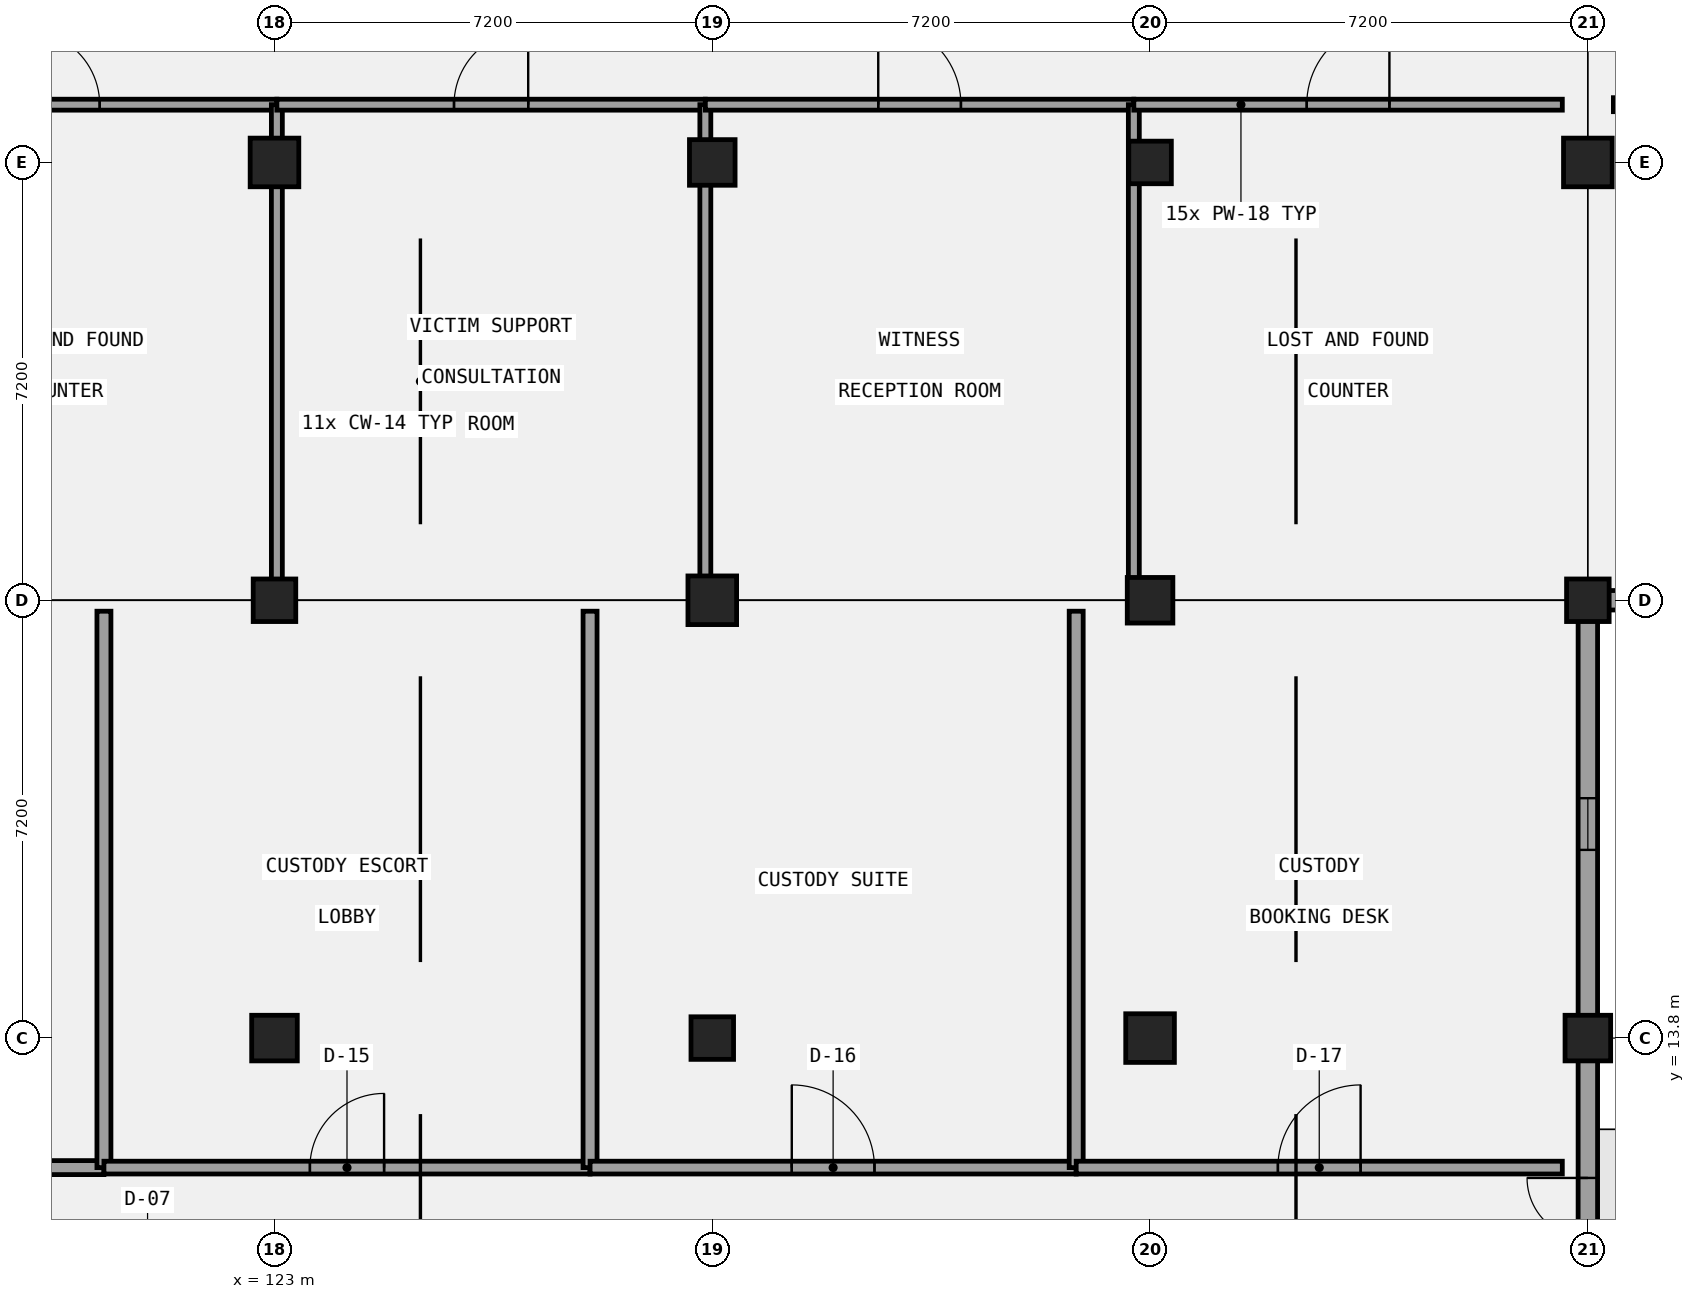
"""IFC4 building model, lengths in metres.
Left out: names, types, materials, properties, quantities, classifications, styles, units other than length and angle.
Written with IfcOpenShell. Run it as: python <this file> out.ifc"""

import sys

from ifc_helpers import new_model, si_unit, direction, frame, frame_2d, origin, origin_2d, place, context, subcontext, project, spatial, rectangle, extrude, element, fill, save


model = new_model("IFC4")
c1 = context("Model", 3, precision=1e-05, world=origin(), true_north=direction((0.0, 1.0)))
c2 = subcontext(c1, "Body", "Model", "MODEL_VIEW")
j1 = project(units=[si_unit("LENGTHUNIT", "METRE"), si_unit("PLANEANGLEUNIT", "RADIAN")], contexts=[c1])
p1 = place(None, origin())
s1 = spatial("IfcSite", under=j1, at=p1, CompositionType="ELEMENT")
p2 = place(p1, origin())
s2 = spatial("IfcBuilding", under=s1, at=p2, CompositionType="ELEMENT")
p3 = place(p2, origin())
s3 = spatial("IfcBuildingStorey", under=s2, at=p3, CompositionType="ELEMENT", Elevation=0.0)
p4 = place(p3, frame((123.0, 13.8, -0.32), z_axis=(0.0, 0.0, 1.0), x_axis=(1.0, 0.0, 0.0)))
e1 = element("IfcColumn", 1, at=p4, inside=s3, PredefinedType="COLUMN", context=c2, shape_type="SweptSolid", body=[
    extrude(rectangle(XDim=0.75, YDim=0.75, at=origin_2d()), origin(), (0.0, 0.0, 1.0), 5.72),
])
p5 = place(p3, frame((123.0, 21.0, 0.0), z_axis=(0.0, 0.0, 1.0), x_axis=(1.0, 0.0, 0.0)))
e2 = element("IfcColumn", 2, at=p5, inside=s3, PredefinedType="COLUMN", context=c2, shape_type="SweptSolid", body=[
    extrude(rectangle(XDim=0.7, YDim=0.7, at=origin_2d()), origin(), (0.0, 0.0, 1.0), 5.4),
])
p6 = place(p3, frame((123.0, 28.2, 0.0), z_axis=(0.0, 0.0, 1.0), x_axis=(1.0, 0.0, 0.0)))
e3 = element("IfcColumn", 3, at=p6, inside=s3, PredefinedType="COLUMN", context=c2, shape_type="SweptSolid", body=[
    extrude(rectangle(XDim=0.8, YDim=0.8, at=origin_2d()), origin(), (0.0, 0.0, 1.0), 5.4),
])
p7 = place(p3, frame((130.2, 13.8, -0.32), z_axis=(0.0, 0.0, 1.0), x_axis=(1.0, 0.0, 0.0)))
e4 = element("IfcColumn", 4, at=p7, inside=s3, PredefinedType="COLUMN", context=c2, shape_type="SweptSolid", body=[
    extrude(rectangle(XDim=0.7, YDim=0.7, at=origin_2d()), origin(), (0.0, 0.0, 1.0), 5.72),
])
p8 = place(p3, frame((130.2, 21.0, 0.0), z_axis=(0.0, 0.0, 1.0), x_axis=(1.0, 0.0, 0.0)))
e5 = element("IfcColumn", 5, at=p8, inside=s3, PredefinedType="COLUMN", context=c2, shape_type="SweptSolid", body=[
    extrude(rectangle(XDim=0.8, YDim=0.8, at=origin_2d()), origin(), (0.0, 0.0, 1.0), 5.4),
])
p9 = place(p3, frame((130.2, 28.2, 0.0), z_axis=(0.0, 0.0, 1.0), x_axis=(1.0, 0.0, 0.0)))
e6 = element("IfcColumn", 6, at=p9, inside=s3, PredefinedType="COLUMN", context=c2, shape_type="SweptSolid", body=[
    extrude(rectangle(XDim=0.75, YDim=0.75, at=origin_2d()), origin(), (0.0, 0.0, 1.0), 5.4),
])
p10 = place(p3, frame((137.4, 13.8, -0.32), z_axis=(0.0, 0.0, 1.0), x_axis=(1.0, 0.0, 0.0)))
e7 = element("IfcColumn", 7, at=p10, inside=s3, PredefinedType="COLUMN", context=c2, shape_type="SweptSolid", body=[
    extrude(rectangle(XDim=0.8, YDim=0.8, at=origin_2d()), origin(), (0.0, 0.0, 1.0), 5.72),
])
p11 = place(p3, frame((137.4, 21.0, 0.0), z_axis=(0.0, 0.0, 1.0), x_axis=(1.0, 0.0, 0.0)))
e8 = element("IfcColumn", 8, at=p11, inside=s3, PredefinedType="COLUMN", context=c2, shape_type="SweptSolid", body=[
    extrude(rectangle(XDim=0.75, YDim=0.75, at=origin_2d()), origin(), (0.0, 0.0, 1.0), 5.4),
])
p12 = place(p3, frame((137.4, 28.2, 0.0), z_axis=(0.0, 0.0, 1.0), x_axis=(1.0, 0.0, 0.0)))
e9 = element("IfcColumn", 9, at=p12, inside=s3, PredefinedType="COLUMN", context=c2, shape_type="SweptSolid", body=[
    extrude(rectangle(XDim=0.7, YDim=0.7, at=origin_2d()), origin(), (0.0, 0.0, 1.0), 5.4),
])
p13 = place(p3, frame((144.6, 13.8, -0.32), z_axis=(0.0, 0.0, 1.0), x_axis=(1.0, 0.0, 0.0)))
e10 = element("IfcColumn", 10, at=p13, inside=s3, PredefinedType="COLUMN", context=c2, shape_type="SweptSolid", body=[
    extrude(rectangle(XDim=0.75, YDim=0.75, at=origin_2d()), origin(), (0.0, 0.0, 1.0), 5.72),
])
p14 = place(p3, frame((144.6, 21.0, 0.0), z_axis=(0.0, 0.0, 1.0), x_axis=(1.0, 0.0, 0.0)))
e11 = element("IfcColumn", 11, at=p14, inside=s3, PredefinedType="COLUMN", context=c2, shape_type="SweptSolid", body=[
    extrude(rectangle(XDim=0.7, YDim=0.7, at=origin_2d()), origin(), (0.0, 0.0, 1.0), 5.4),
])
p15 = place(p3, frame((144.6, 28.2, 0.0), z_axis=(0.0, 0.0, 1.0), x_axis=(1.0, 0.0, 0.0)))
e12 = element("IfcColumn", 12, at=p15, inside=s3, PredefinedType="COLUMN", context=c2, shape_type="SweptSolid", body=[
    extrude(rectangle(XDim=0.8, YDim=0.8, at=origin_2d()), origin(), (0.0, 0.0, 1.0), 5.4),
])
p16 = place(p3, frame((144.6, 0.16, 0.0), z_axis=(0.0, 0.0, 1.0), x_axis=(0.0, 1.0, 0.0)))
e13 = element("IfcWall", 13, at=p16, inside=s3, PredefinedType="SOLIDWALL", context=c2, shape_type="SweptSolid", body=[
    extrude(rectangle(XDim=20.68, YDim=0.32, at=frame_2d((10.34, 0.0))), origin(), (0.0, 0.0, 1.0), 4.12),
])
p17 = place(p16, frame((9.34, 0.0, 0.0)))
e14 = element("IfcOpeningElement", 14, at=p17, cuts=e13, PredefinedType="OPENING", context=c2, shape_type="SweptSolid", body=[
    extrude(rectangle(XDim=2.0, YDim=2.6, at=frame_2d((1.0, 1.3))), frame((0.0, 0.17, 0.0), z_axis=(0.0, -1.0, 0.0), x_axis=(1.0, 0.0, 0.0)), (0.0, 0.0, 1.0), 0.34),
])
p18 = place(p16, frame((2.795, 0.0, 1.0)))
e15 = element("IfcOpeningElement", 15, at=p18, cuts=e13, PredefinedType="OPENING", context=c2, shape_type="SweptSolid", body=[
    extrude(rectangle(XDim=0.85, YDim=1.9, at=frame_2d((0.425, 0.95))), frame((0.0, 0.17, 0.0), z_axis=(0.0, -1.0, 0.0), x_axis=(1.0, 0.0, 0.0)), (0.0, 0.0, 1.0), 0.34),
])
p19 = place(p16, frame((16.735, 0.0, 1.0)))
e16 = element("IfcOpeningElement", 16, at=p19, cuts=e13, PredefinedType="OPENING", context=c2, shape_type="SweptSolid", body=[
    extrude(rectangle(XDim=0.85, YDim=1.9, at=frame_2d((0.425, 0.95))), frame((0.0, 0.17, 0.0), z_axis=(0.0, -1.0, 0.0), x_axis=(1.0, 0.0, 0.0)), (0.0, 0.0, 1.0), 0.34),
])
p20 = place(p3, frame((144.44, 21.0, 0.0), z_axis=(0.0, 0.0, 1.0), x_axis=(1.0, 0.0, 0.0)))
e17 = element("IfcWall", 17, at=p20, inside=s3, PredefinedType="SOLIDWALL", context=c2, shape_type="SweptSolid", body=[
    extrude(rectangle(XDim=29.72, YDim=0.32, at=frame_2d((14.86, 0.0))), origin(), (0.0, 0.0, 1.0), 3.35),
])
p21 = place(p20, frame((3.335, 0.0, 1.0)))
e18 = element("IfcOpeningElement", 18, at=p21, cuts=e17, PredefinedType="OPENING", context=c2, shape_type="SweptSolid", body=[
    extrude(rectangle(XDim=0.85, YDim=2.15, at=frame_2d((0.425, 1.075))), frame((0.0, 0.17, 0.0), z_axis=(0.0, -1.0, 0.0), x_axis=(1.0, 0.0, 0.0)), (0.0, 0.0, 1.0), 0.34),
])
p22 = place(p20, frame((10.535, 0.0, 1.0)))
e19 = element("IfcOpeningElement", 19, at=p22, cuts=e17, PredefinedType="OPENING", context=c2, shape_type="SweptSolid", body=[
    extrude(rectangle(XDim=0.85, YDim=2.15, at=frame_2d((0.425, 1.075))), frame((0.0, 0.17, 0.0), z_axis=(0.0, -1.0, 0.0), x_axis=(1.0, 0.0, 0.0)), (0.0, 0.0, 1.0), 0.34),
])
p23 = place(p20, frame((17.735, 0.0, 1.0)))
e20 = element("IfcOpeningElement", 20, at=p23, cuts=e17, PredefinedType="OPENING", context=c2, shape_type="SweptSolid", body=[
    extrude(rectangle(XDim=0.85, YDim=2.15, at=frame_2d((0.425, 1.075))), frame((0.0, 0.17, 0.0), z_axis=(0.0, -1.0, 0.0), x_axis=(1.0, 0.0, 0.0)), (0.0, 0.0, 1.0), 0.34),
])
p24 = place(p20, frame((25.235, 0.0, 1.0)))
e21 = element("IfcOpeningElement", 21, at=p24, cuts=e17, PredefinedType="OPENING", context=c2, shape_type="SweptSolid", body=[
    extrude(rectangle(XDim=0.85, YDim=2.15, at=frame_2d((0.425, 1.075))), frame((0.0, 0.17, 0.0), z_axis=(0.0, -1.0, 0.0), x_axis=(1.0, 0.0, 0.0)), (0.0, 0.0, 1.0), 0.34),
])
p25 = place(p3, frame((115.991, 29.15, 0.0), z_axis=(0.0, 0.0, 1.0), x_axis=(1.0, 0.0, 0.0)))
e22 = element("IfcWall", 22, at=p25, inside=s3, PredefinedType="PARTITIONING", context=c2, shape_type="SweptSolid", body=[
    extrude(rectangle(XDim=7.048, YDim=0.18, at=frame_2d((3.524, 0.0))), origin(), (0.0, 0.0, 1.0), 5.12),
])
p26 = place(p25, frame((2.914, 0.0, 0.0)))
e23 = element("IfcOpeningElement", 23, at=p26, cuts=e22, PredefinedType="OPENING", context=c2, shape_type="SweptSolid", body=[
    extrude(rectangle(XDim=1.22, YDim=2.22, at=frame_2d((0.61, 1.11))), frame((0.0, 0.1, 0.0), z_axis=(0.0, -1.0, 0.0), x_axis=(1.0, 0.0, 0.0)), (0.0, 0.0, 1.0), 0.2),
])
p27 = place(p3, frame((123.039, 21.18, 0.0), z_axis=(0.0, 0.0, 1.0), x_axis=(0.0, 1.0, 0.0)))
e24 = element("IfcWall", 24, at=p27, inside=s3, PredefinedType="PARTITIONING", context=c2, shape_type="SweptSolid", body=[
    extrude(rectangle(XDim=7.97, YDim=0.18, at=frame_2d((3.985, 0.0))), origin(), (0.0, 0.0, 1.0), 4.12),
])
p28 = place(p3, frame((123.039, 29.15, 0.0), z_axis=(0.0, 0.0, 1.0), x_axis=(1.0, 0.0, 0.0)))
e25 = element("IfcWall", 25, at=p28, inside=s3, PredefinedType="PARTITIONING", context=c2, shape_type="SweptSolid", body=[
    extrude(rectangle(XDim=7.047, YDim=0.18, at=frame_2d((3.523, 0.0))), origin(), (0.0, 0.0, 1.0), 5.12),
])
p29 = place(p28, frame((2.914, 0.0, 0.0)))
e26 = element("IfcOpeningElement", 26, at=p29, cuts=e25, PredefinedType="OPENING", context=c2, shape_type="SweptSolid", body=[
    extrude(rectangle(XDim=1.22, YDim=2.35, at=frame_2d((0.61, 1.175))), frame((0.0, 0.1, 0.0), z_axis=(0.0, -1.0, 0.0), x_axis=(1.0, 0.0, 0.0)), (0.0, 0.0, 1.0), 0.2),
])
p30 = place(p3, frame((130.086, 21.18, 0.0), z_axis=(0.0, 0.0, 1.0), x_axis=(0.0, 1.0, 0.0)))
e27 = element("IfcWall", 27, at=p30, inside=s3, PredefinedType="PARTITIONING", context=c2, shape_type="SweptSolid", body=[
    extrude(rectangle(XDim=7.97, YDim=0.18, at=frame_2d((3.985, 0.0))), origin(), (0.0, 0.0, 1.0), 4.12),
])
p31 = place(p3, frame((130.086, 29.15, 0.0), z_axis=(0.0, 0.0, 1.0), x_axis=(1.0, 0.0, 0.0)))
e28 = element("IfcWall", 28, at=p31, inside=s3, PredefinedType="PARTITIONING", context=c2, shape_type="SweptSolid", body=[
    extrude(rectangle(XDim=7.047, YDim=0.18, at=frame_2d((3.523, 0.0))), origin(), (0.0, 0.0, 1.0), 5.12),
])
p32 = place(p31, frame((2.844, 0.0, 0.0)))
e29 = element("IfcOpeningElement", 29, at=p32, cuts=e28, PredefinedType="OPENING", context=c2, shape_type="SweptSolid", body=[
    extrude(rectangle(XDim=1.36, YDim=2.1, at=frame_2d((0.68, 1.05))), frame((0.0, 0.1, 0.0), z_axis=(0.0, -1.0, 0.0), x_axis=(1.0, 0.0, 0.0)), (0.0, 0.0, 1.0), 0.2),
])
p33 = place(p3, frame((137.133, 21.18, 0.0), z_axis=(0.0, 0.0, 1.0), x_axis=(0.0, 1.0, 0.0)))
e30 = element("IfcWall", 30, at=p33, inside=s3, PredefinedType="PARTITIONING", context=c2, shape_type="SweptSolid", body=[
    extrude(rectangle(XDim=7.97, YDim=0.18, at=frame_2d((3.985, 0.0))), origin(), (0.0, 0.0, 1.0), 4.52),
])
p34 = place(p3, frame((137.133, 29.15, 0.0), z_axis=(0.0, 0.0, 1.0), x_axis=(1.0, 0.0, 0.0)))
e31 = element("IfcWall", 31, at=p34, inside=s3, PredefinedType="PARTITIONING", context=c2, shape_type="SweptSolid", body=[
    extrude(rectangle(XDim=7.047, YDim=0.18, at=frame_2d((3.523, 0.0))), origin(), (0.0, 0.0, 1.0), 5.12),
])
p35 = place(p34, frame((2.844, 0.0, 0.0)))
e32 = element("IfcOpeningElement", 32, at=p35, cuts=e31, PredefinedType="OPENING", context=c2, shape_type="SweptSolid", body=[
    extrude(rectangle(XDim=1.36, YDim=2.22, at=frame_2d((0.68, 1.11))), frame((0.0, 0.1, 0.0), z_axis=(0.0, -1.0, 0.0), x_axis=(1.0, 0.0, 0.0)), (0.0, 0.0, 1.0), 0.2),
])
p36 = place(p3, frame((145.02, 29.15, 0.0), z_axis=(0.0, 0.0, 1.0), x_axis=(1.0, 0.0, 0.0)))
e33 = element("IfcWall", 33, at=p36, inside=s3, PredefinedType="PARTITIONING", context=c2, shape_type="SweptSolid", body=[
    extrude(rectangle(XDim=7.14, YDim=0.23, at=frame_2d((3.57, 0.0))), origin(), (0.0, 0.0, 1.0), 5.12),
])
p37 = place(p36, frame((2.81, 0.0, 0.0)))
e34 = element("IfcOpeningElement", 34, at=p37, cuts=e33, PredefinedType="OPENING", context=c2, shape_type="SweptSolid", body=[
    extrude(rectangle(XDim=1.52, YDim=2.1, at=frame_2d((0.76, 1.05))), frame((0.0, 0.125, 0.0), z_axis=(0.0, -1.0, 0.0), x_axis=(1.0, 0.0, 0.0)), (0.0, 0.0, 1.0), 0.25),
])
p38 = place(p3, frame((112.2, 11.67, 0.0), z_axis=(0.0, 0.0, 1.0), x_axis=(1.0, 0.0, 0.0)))
e35 = element("IfcWall", 35, at=p38, inside=s3, PredefinedType="PARTITIONING", context=c2, shape_type="SweptSolid", body=[
    extrude(rectangle(XDim=7.995, YDim=0.23, at=frame_2d((3.998, 0.0))), origin(), (0.0, 0.0, 1.0), 5.12),
])
p39 = place(p38, frame((4.587, 0.0, 0.0)))
e36 = element("IfcOpeningElement", 36, at=p39, cuts=e35, PredefinedType="OPENING", context=c2, shape_type="SweptSolid", body=[
    extrude(rectangle(XDim=1.22, YDim=2.22, at=frame_2d((0.61, 1.11))), frame((0.0, 0.125, 0.0), z_axis=(0.0, -1.0, 0.0), x_axis=(1.0, 0.0, 0.0)), (0.0, 0.0, 1.0), 0.25),
])
p40 = place(p3, frame((120.195, 11.67, 0.0), z_axis=(0.0, 0.0, 1.0), x_axis=(0.0, 1.0, 0.0)))
e37 = element("IfcWall", 37, at=p40, inside=s3, PredefinedType="PARTITIONING", context=c2, shape_type="SweptSolid", body=[
    extrude(rectangle(XDim=9.15, YDim=0.23, at=frame_2d((4.575, 0.0))), origin(), (0.0, 0.0, 1.0), 5.12),
])
p41 = place(p3, frame((120.195, 11.67, 0.0), z_axis=(0.0, 0.0, 1.0), x_axis=(1.0, 0.0, 0.0)))
e38 = element("IfcWall", 38, at=p41, inside=s3, PredefinedType="PARTITIONING", context=c2, shape_type="SweptSolid", body=[
    extrude(rectangle(XDim=7.995, YDim=0.21, at=frame_2d((3.998, 0.0))), origin(), (0.0, 0.0, 1.0), 5.12),
])
p42 = place(p41, frame((3.387, 0.0, 0.0)))
e39 = element("IfcOpeningElement", 39, at=p42, cuts=e38, PredefinedType="OPENING", context=c2, shape_type="SweptSolid", body=[
    extrude(rectangle(XDim=1.22, YDim=2.35, at=frame_2d((0.61, 1.175))), frame((0.0, 0.115, 0.0), z_axis=(0.0, -1.0, 0.0), x_axis=(1.0, 0.0, 0.0)), (0.0, 0.0, 1.0), 0.23),
])
p43 = place(p3, frame((128.19, 11.67, 0.0), z_axis=(0.0, 0.0, 1.0), x_axis=(0.0, 1.0, 0.0)))
e40 = element("IfcWall", 40, at=p43, inside=s3, PredefinedType="PARTITIONING", context=c2, shape_type="SweptSolid", body=[
    extrude(rectangle(XDim=9.15, YDim=0.23, at=frame_2d((4.575, 0.0))), origin(), (0.0, 0.0, 1.0), 5.12),
])
p44 = place(p3, frame((128.19, 11.67, 0.0), z_axis=(0.0, 0.0, 1.0), x_axis=(1.0, 0.0, 0.0)))
e41 = element("IfcWall", 41, at=p44, inside=s3, PredefinedType="PARTITIONING", context=c2, shape_type="SweptSolid", body=[
    extrude(rectangle(XDim=7.995, YDim=0.21, at=frame_2d((3.998, 0.0))), origin(), (0.0, 0.0, 1.0), 5.12),
])
p45 = place(p44, frame((3.317, 0.0, 0.0)))
e42 = element("IfcOpeningElement", 42, at=p45, cuts=e41, PredefinedType="OPENING", context=c2, shape_type="SweptSolid", body=[
    extrude(rectangle(XDim=1.36, YDim=2.1, at=frame_2d((0.68, 1.05))), frame((0.0, 0.115, 0.0), z_axis=(0.0, -1.0, 0.0), x_axis=(1.0, 0.0, 0.0)), (0.0, 0.0, 1.0), 0.23),
])
p46 = place(p3, frame((136.185, 11.67, 0.0), z_axis=(0.0, 0.0, 1.0), x_axis=(0.0, 1.0, 0.0)))
e43 = element("IfcWall", 43, at=p46, inside=s3, PredefinedType="PARTITIONING", context=c2, shape_type="SweptSolid", body=[
    extrude(rectangle(XDim=9.15, YDim=0.23, at=frame_2d((4.575, 0.0))), origin(), (0.0, 0.0, 1.0), 5.12),
])
p47 = place(p3, frame((136.185, 11.67, 0.0), z_axis=(0.0, 0.0, 1.0), x_axis=(1.0, 0.0, 0.0)))
e44 = element("IfcWall", 44, at=p47, inside=s3, PredefinedType="PARTITIONING", context=c2, shape_type="SweptSolid", body=[
    extrude(rectangle(XDim=7.995, YDim=0.21, at=frame_2d((3.998, 0.0))), origin(), (0.0, 0.0, 1.0), 5.12),
])
p48 = place(p47, frame((3.317, 0.0, 0.0)))
e45 = element("IfcOpeningElement", 45, at=p48, cuts=e44, PredefinedType="OPENING", context=c2, shape_type="SweptSolid", body=[
    extrude(rectangle(XDim=1.36, YDim=2.22, at=frame_2d((0.68, 1.11))), frame((0.0, 0.115, 0.0), z_axis=(0.0, -1.0, 0.0), x_axis=(1.0, 0.0, 0.0)), (0.0, 0.0, 1.0), 0.23),
])
p49 = place(p17, frame((2.0, 0.0, 0.0), z_axis=(0.0, 0.0, 1.0), x_axis=(-1.0, 0.0, 0.0)))
e46 = element("IfcDoor", 46, at=p49, inside=s3, OperationType="DOUBLE_DOOR_SINGLE_SWING", PredefinedType="DOOR", context=c2, shape_type="SweptSolid", body=[
    extrude(rectangle(XDim=2.0, YDim=2.6, at=frame_2d((1.0, 1.3))), frame((0.0, 0.025, 0.0), z_axis=(0.0, -1.0, 0.0), x_axis=(1.0, 0.0, 0.0)), (0.0, 0.0, 1.0), 0.05),
])
fill(e14, e46)
p50 = place(p19, origin())
e47 = element("IfcWindow", 47, at=p50, inside=s3, PartitioningType="SINGLE_PANEL", PredefinedType="WINDOW", context=c2, shape_type="SweptSolid", body=[
    extrude(rectangle(XDim=0.85, YDim=1.9, at=frame_2d((0.425, 0.95))), frame((0.0, 0.03, 0.0), z_axis=(0.0, -1.0, 0.0), x_axis=(1.0, 0.0, 0.0)), (0.0, 0.0, 1.0), 0.06),
])
fill(e16, e47)
p51 = place(p26, frame((1.22, 0.0, 0.0), z_axis=(0.0, 0.0, 1.0), x_axis=(-1.0, 0.0, 0.0)))
e48 = element("IfcDoor", 48, at=p51, inside=s3, OperationType="SINGLE_SWING_LEFT", PredefinedType="DOOR", context=c2, shape_type="SweptSolid", body=[
    extrude(rectangle(XDim=1.22, YDim=2.22, at=frame_2d((0.61, 1.11))), frame((0.0, 0.025, 0.0), z_axis=(0.0, -1.0, 0.0), x_axis=(1.0, 0.0, 0.0)), (0.0, 0.0, 1.0), 0.05),
])
fill(e23, e48)
p52 = place(p29, frame((1.22, 0.0, 0.0), z_axis=(0.0, 0.0, 1.0), x_axis=(-1.0, 0.0, 0.0)))
e49 = element("IfcDoor", 49, at=p52, inside=s3, OperationType="SINGLE_SWING_RIGHT", PredefinedType="DOOR", context=c2, shape_type="SweptSolid", body=[
    extrude(rectangle(XDim=1.22, YDim=2.35, at=frame_2d((0.61, 1.175))), frame((0.0, 0.025, 0.0), z_axis=(0.0, -1.0, 0.0), x_axis=(1.0, 0.0, 0.0)), (0.0, 0.0, 1.0), 0.05),
])
fill(e26, e49)
p53 = place(p32, frame((1.36, 0.0, 0.0), z_axis=(0.0, 0.0, 1.0), x_axis=(-1.0, 0.0, 0.0)))
e50 = element("IfcDoor", 50, at=p53, inside=s3, OperationType="SINGLE_SWING_LEFT", PredefinedType="DOOR", context=c2, shape_type="SweptSolid", body=[
    extrude(rectangle(XDim=1.36, YDim=2.1, at=frame_2d((0.68, 1.05))), frame((0.0, 0.025, 0.0), z_axis=(0.0, -1.0, 0.0), x_axis=(1.0, 0.0, 0.0)), (0.0, 0.0, 1.0), 0.05),
])
fill(e29, e50)
p54 = place(p35, frame((1.36, 0.0, 0.0), z_axis=(0.0, 0.0, 1.0), x_axis=(-1.0, 0.0, 0.0)))
e51 = element("IfcDoor", 51, at=p54, inside=s3, OperationType="SINGLE_SWING_RIGHT", PredefinedType="DOOR", context=c2, shape_type="SweptSolid", body=[
    extrude(rectangle(XDim=1.36, YDim=2.22, at=frame_2d((0.68, 1.11))), frame((0.0, 0.025, 0.0), z_axis=(0.0, -1.0, 0.0), x_axis=(1.0, 0.0, 0.0)), (0.0, 0.0, 1.0), 0.05),
])
fill(e32, e51)
p55 = place(p42, origin())
e52 = element("IfcDoor", 52, at=p55, inside=s3, OperationType="SINGLE_SWING_RIGHT", PredefinedType="DOOR", context=c2, shape_type="SweptSolid", body=[
    extrude(rectangle(XDim=1.22, YDim=2.35, at=frame_2d((0.61, 1.175))), frame((0.0, 0.025, 0.0), z_axis=(0.0, -1.0, 0.0), x_axis=(1.0, 0.0, 0.0)), (0.0, 0.0, 1.0), 0.05),
])
fill(e39, e52)
p56 = place(p45, origin())
e53 = element("IfcDoor", 53, at=p56, inside=s3, OperationType="SINGLE_SWING_LEFT", PredefinedType="DOOR", context=c2, shape_type="SweptSolid", body=[
    extrude(rectangle(XDim=1.36, YDim=2.1, at=frame_2d((0.68, 1.05))), frame((0.0, 0.025, 0.0), z_axis=(0.0, -1.0, 0.0), x_axis=(1.0, 0.0, 0.0)), (0.0, 0.0, 1.0), 0.05),
])
fill(e42, e53)
p57 = place(p48, origin())
e54 = element("IfcDoor", 54, at=p57, inside=s3, OperationType="SINGLE_SWING_RIGHT", PredefinedType="DOOR", context=c2, shape_type="SweptSolid", body=[
    extrude(rectangle(XDim=1.36, YDim=2.22, at=frame_2d((0.68, 1.11))), frame((0.0, 0.025, 0.0), z_axis=(0.0, -1.0, 0.0), x_axis=(1.0, 0.0, 0.0)), (0.0, 0.0, 1.0), 0.05),
])
fill(e45, e54)
save(model, sys.argv[1])
